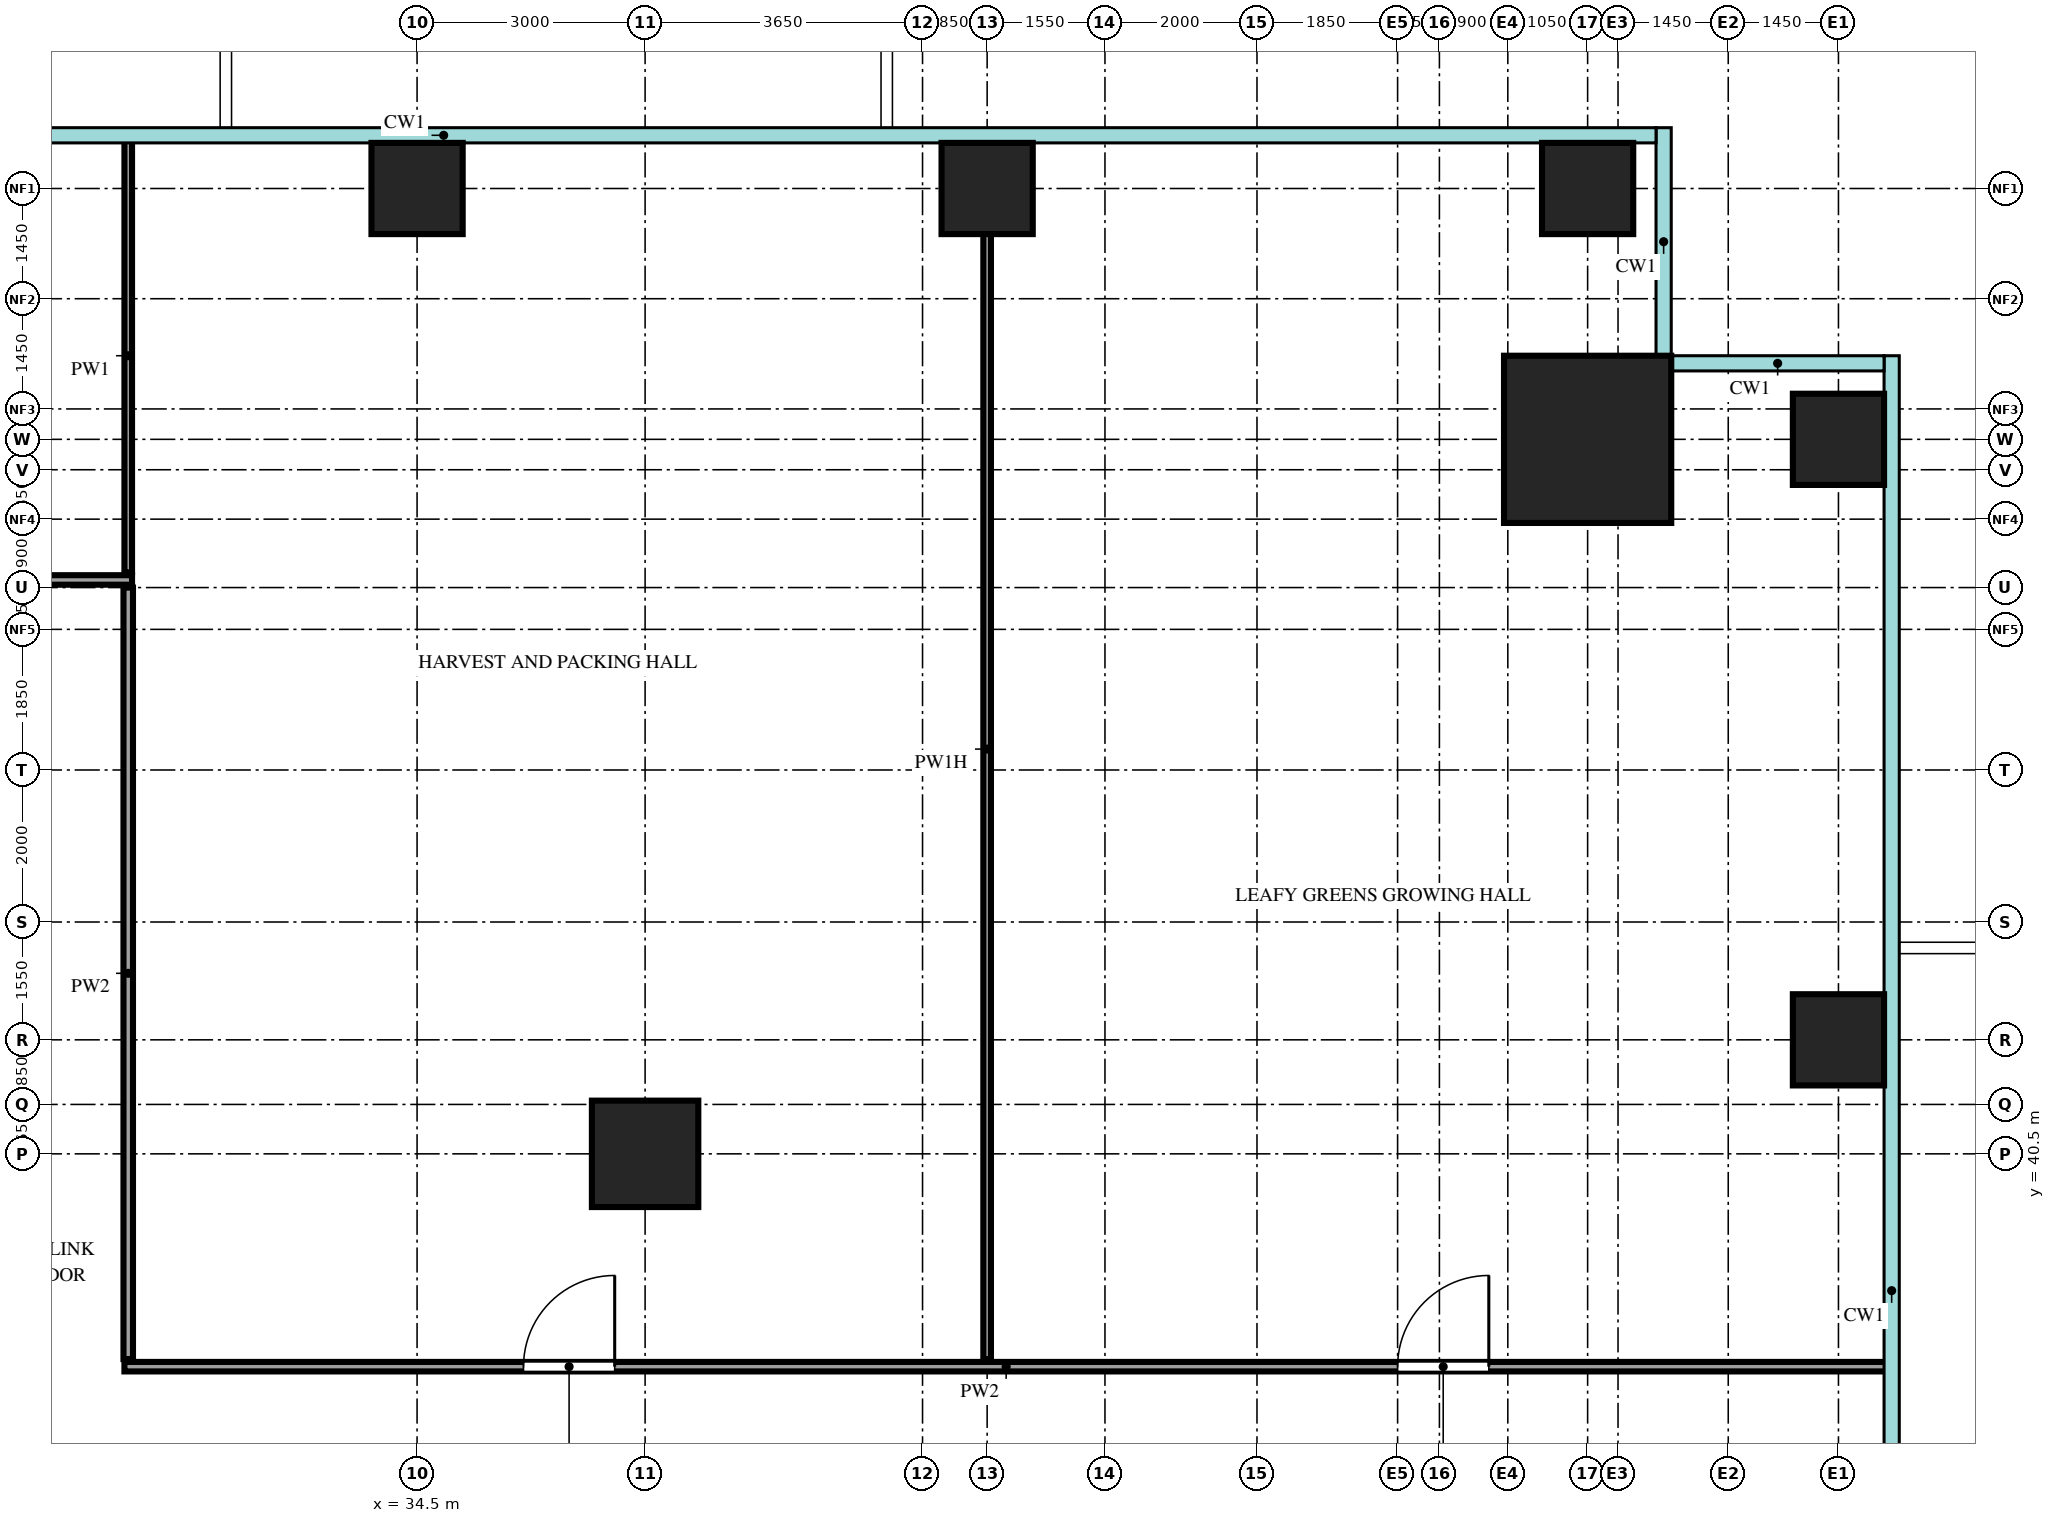
"""IFC4 building model, lengths in metres.
Left out: names, types, materials, properties, quantities, classifications, styles, units other than length and angle.
Written with IfcOpenShell. Run it as: python <this file> out.ifc"""

import sys

from ifc_helpers import new_model, si_unit, direction, frame, frame_2d, origin, origin_2d, place, context, subcontext, project, spatial, rectangle, extrude, source, transform, mapped, element, fill, save


model = new_model("IFC4")
c1 = context("Model", 3, precision=1e-05, world=origin(), true_north=direction((0.0, 1.0)))
c2 = subcontext(c1, "Body", "Model", "MODEL_VIEW")
j1 = project(units=[si_unit("LENGTHUNIT", "METRE"), si_unit("PLANEANGLEUNIT", "RADIAN")], contexts=[c1])
p1 = place(None, origin())
s1 = spatial("IfcSite", under=j1, at=p1, CompositionType="ELEMENT")
p2 = place(p1, origin())
s2 = spatial("IfcBuilding", under=s1, at=p2, CompositionType="ELEMENT")
p3 = place(p2, frame((0.0, 0.0, 42.0)))
s3 = spatial("IfcBuildingStorey", under=s2, at=p3, CompositionType="ELEMENT", Elevation=42.0)
m1 = source(origin(), c2, "Body", "SweptSolid", [
    extrude(rectangle(XDim=2.2, YDim=2.2, at=origin_2d()), origin(), (0.0, 0.0, 1.0), 4.5),
])
p4 = place(p3, frame((49.9, 49.9, 0.0), z_axis=(0.0, 0.0, 1.0), x_axis=(1.0, 0.0, 0.0)))
e1 = element("IfcColumn", 1, at=p4, inside=s3, PredefinedType="COLUMN", context=c2, shape_type="MappedRepresentation", body=[
    mapped(m1, transform((0.0, 0.0, 0.0))),
])
m2 = source(origin(), c2, "Body", "SweptSolid", [
    extrude(rectangle(XDim=1.2, YDim=1.2, at=origin_2d()), origin(), (0.0, 0.0, 1.0), 4.2),
])
for number, where, z_axis, x_axis in (
    (2, (53.2, 42.0, 0.0), (0.0, 0.0, 1.0), (1.0, 0.0, 0.0)),
    (3, (53.2, 49.9, 0.0), (0.0, 0.0, 1.0), (1.0, 0.0, 0.0)),
    (4, (34.5, 53.2, 0.0), (0.0, 0.0, 1.0), (1.0, 0.0, 0.0)),
    (5, (42.0, 53.2, 0.0), (0.0, 0.0, 1.0), (1.0, 0.0, 0.0)),
    (6, (49.9, 53.2, 0.0), (0.0, 0.0, 1.0), (1.0, 0.0, 0.0)),
):
    element("IfcColumn", number, at=place(p3, frame(where, z_axis=z_axis, x_axis=x_axis)), inside=s3, PredefinedType="COLUMN", context=c2, shape_type="MappedRepresentation", body=[
        mapped(m2, transform((0.0, 0.0, 0.0))),
    ])
m3 = source(origin(), c2, "Body", "SweptSolid", [
    extrude(rectangle(XDim=1.4, YDim=1.4, at=origin_2d()), origin(), (0.0, 0.0, 1.0), 4.2),
])
p5 = place(p3, frame((37.5, 40.5, 0.0), z_axis=(0.0, 0.0, 1.0), x_axis=(1.0, 0.0, 0.0)))
e7 = element("IfcColumn", 7, at=p5, inside=s3, PredefinedType="COLUMN", context=c2, shape_type="MappedRepresentation", body=[
    mapped(m3, transform((0.0, 0.0, 0.0))),
])
m4 = source(origin(), c2, "Body", "SweptSolid", [
    extrude(rectangle(XDim=23.2, YDim=0.125, at=frame_2d((11.6, 0.0))), origin(), (0.0, 0.0, 1.0), 4.3),
])
p6 = place(p3, frame((30.65, 37.7, 0.0), z_axis=(0.0, 0.0, 1.0), x_axis=(1.0, 0.0, 0.0)))
e8 = element("IfcWall", 8, at=p6, inside=s3, PredefinedType="PARTITIONING", context=c2, shape_type="MappedRepresentation", body=[
    mapped(m4, transform((0.0, 0.0, 0.0))),
])
m5 = source(origin(), c2, "Body", "SweptSolid", [
    extrude(rectangle(XDim=1.2, YDim=2.1, at=frame_2d((0.6, 1.05))), frame((0.0, 0.073, 0.0), z_axis=(0.0, -1.0, 0.0), x_axis=(1.0, 0.0, 0.0)), (0.0, 0.0, 1.0), 0.145),
])
p7 = place(p6, frame((5.25, 0.0, 0.0)))
e9 = element("IfcOpeningElement", 9, at=p7, cuts=e8, PredefinedType="OPENING", context=c2, shape_type="MappedRepresentation", body=[
    mapped(m5, transform((0.0, 0.0, 0.0))),
])
p8 = place(p6, frame((16.75, 0.0, 0.0)))
e10 = element("IfcOpeningElement", 10, at=p8, cuts=e8, PredefinedType="OPENING", context=c2, shape_type="MappedRepresentation", body=[
    mapped(m5, transform((0.0, 0.0, 0.0))),
])
m6 = source(origin(), c2, "Body", "SweptSolid", [
    extrude(rectangle(XDim=10.15, YDim=0.125, at=frame_2d((5.075, 0.0))), origin(), (0.0, 0.0, 1.0), 4.3),
])
p9 = place(p3, frame((30.7, 37.8, 0.0), z_axis=(0.0, 0.0, 1.0), x_axis=(0.0, 1.0, 0.0)))
e11 = element("IfcWall", 11, at=p9, inside=s3, PredefinedType="PARTITIONING", context=c2, shape_type="MappedRepresentation", body=[
    mapped(m6, transform((0.0, 0.0, 0.0))),
])
m7 = source(origin(), c2, "Body", "SweptSolid", [
    extrude(rectangle(XDim=16.05, YDim=0.1, at=frame_2d((8.025, 0.0))), origin(), (0.0, 0.0, 1.0), 3.7),
])
p10 = place(p3, frame((42.0, 37.8, 0.0), z_axis=(0.0, 0.0, 1.0), x_axis=(0.0, 1.0, 0.0)))
e12 = element("IfcWall", 12, at=p10, inside=s3, PredefinedType="PARTITIONING", context=c2, shape_type="MappedRepresentation", body=[
    mapped(m7, transform((0.0, 0.0, 0.0))),
])
m8 = source(origin(), c2, "Body", "SweptSolid", [
    extrude(rectangle(XDim=26.45, YDim=0.125, at=frame_2d((13.225, 0.0))), origin(), (0.0, 0.0, 1.0), 4.3),
])
p11 = place(p3, frame((4.3, 48.05, 0.0), z_axis=(0.0, 0.0, 1.0), x_axis=(1.0, 0.0, 0.0)))
e13 = element("IfcWall", 13, at=p11, inside=s3, PredefinedType="PARTITIONING", context=c2, shape_type="MappedRepresentation", body=[
    mapped(m8, transform((0.0, 0.0, 0.0))),
])
m9 = source(origin(), c2, "Body", "SweptSolid", [
    extrude(rectangle(XDim=0.9, YDim=2.1, at=frame_2d((0.45, 1.05))), frame((0.0, 0.073, 0.0), z_axis=(0.0, -1.0, 0.0), x_axis=(1.0, 0.0, 0.0)), (0.0, 0.0, 1.0), 0.145),
])
p12 = place(p11, frame((3.35, 0.0, 0.0)))
e14 = element("IfcOpeningElement", 14, at=p12, cuts=e13, PredefinedType="OPENING", context=c2, shape_type="MappedRepresentation", body=[
    mapped(m9, transform((0.0, 0.0, 0.0))),
])
p13 = place(p11, frame((10.85, 0.0, 0.0)))
e15 = element("IfcOpeningElement", 15, at=p13, cuts=e13, PredefinedType="OPENING", context=c2, shape_type="MappedRepresentation", body=[
    mapped(m9, transform((0.0, 0.0, 0.0))),
])
p14 = place(p11, frame((20.35, 0.0, 0.0)))
e16 = element("IfcOpeningElement", 16, at=p14, cuts=e13, PredefinedType="OPENING", context=c2, shape_type="MappedRepresentation", body=[
    mapped(m9, transform((0.0, 0.0, 0.0))),
])
m10 = source(origin(), c2, "Body", "SweptSolid", [
    extrude(rectangle(XDim=5.7, YDim=0.1, at=frame_2d((2.85, 0.0))), origin(), (0.0, 0.0, 1.0), 4.3),
])
p15 = place(p3, frame((30.7, 48.15, 0.0), z_axis=(0.0, 0.0, 1.0), x_axis=(0.0, 1.0, 0.0)))
e17 = element("IfcWall", 17, at=p15, inside=s3, PredefinedType="PARTITIONING", context=c2, shape_type="MappedRepresentation", body=[
    mapped(m10, transform((0.0, 0.0, 0.0))),
])
m11 = source(origin(), c2, "Body", "SweptSolid", [
    extrude(rectangle(XDim=1.2, YDim=2.1, at=frame_2d((0.6, 1.05))), frame((0.0, 0.025, 0.0), z_axis=(0.0, -1.0, 0.0), x_axis=(1.0, 0.0, 0.0)), (0.0, 0.0, 1.0), 0.05),
])
p16 = place(p7, origin())
e18 = element("IfcDoor", 18, at=p16, inside=s3, OperationType="SINGLE_SWING_LEFT", PredefinedType="DOOR", context=c2, shape_type="MappedRepresentation", body=[
    mapped(m11, transform((0.0, 0.0, 0.0))),
])
fill(e9, e18)
p17 = place(p8, origin())
e19 = element("IfcDoor", 19, at=p17, inside=s3, OperationType="SINGLE_SWING_LEFT", PredefinedType="DOOR", context=c2, shape_type="MappedRepresentation", body=[
    mapped(m11, transform((0.0, 0.0, 0.0))),
])
fill(e10, e19)
save(model, sys.argv[1])
